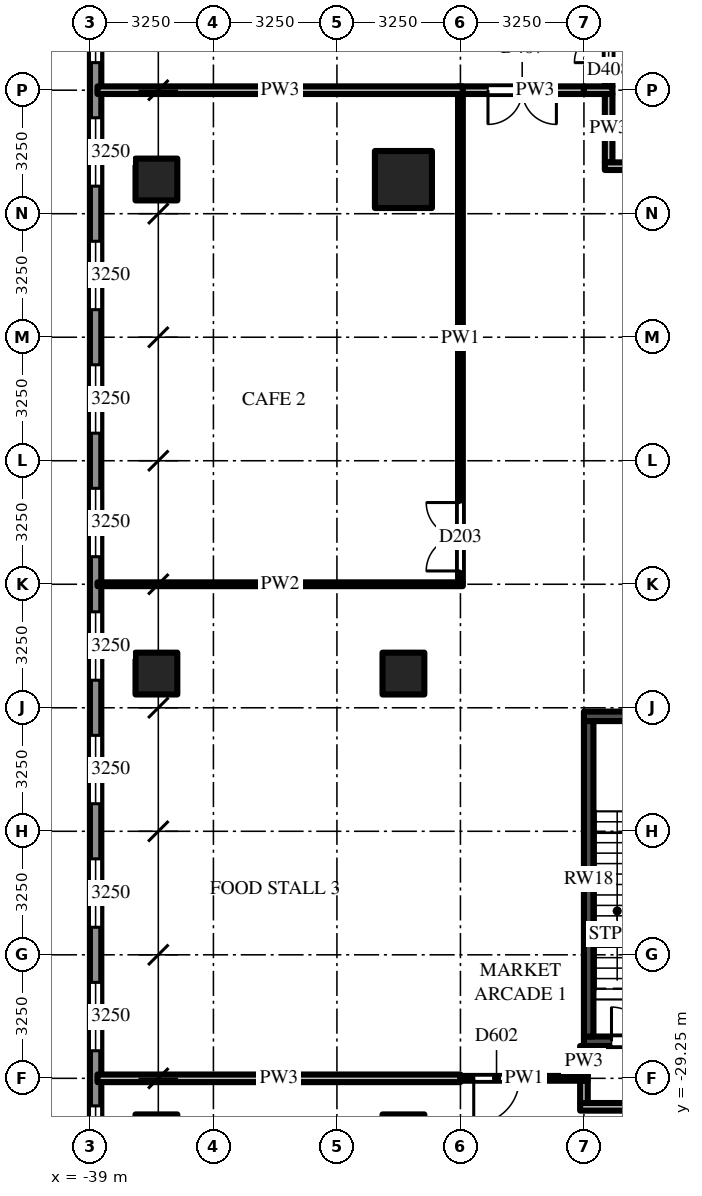
"""IFC4 building model, lengths in metres.
Left out: names, types, materials, properties, quantities, classifications, styles, units other than length and angle.
Written with IfcOpenShell. Run it as: python <this file> out.ifc"""

import sys

from ifc_helpers import new_model, si_unit, direction, frame, frame_2d, origin, origin_2d, place, context, subcontext, project, spatial, rectangle, extrude, source, transform, mapped, element, fill, save


model = new_model("IFC4")
c1 = context("Model", 3, precision=1e-05, world=origin(), true_north=direction((0.0, 1.0)))
c2 = subcontext(c1, "Body", "Model", "MODEL_VIEW")
j1 = project(units=[si_unit("LENGTHUNIT", "METRE"), si_unit("PLANEANGLEUNIT", "RADIAN")], contexts=[c1])
p1 = place(None, origin())
s1 = spatial("IfcSite", under=j1, at=p1, CompositionType="ELEMENT")
p2 = place(p1, origin())
s2 = spatial("IfcBuilding", under=s1, at=p2, CompositionType="ELEMENT")
p3 = place(p2, frame((0.0, 0.0, 19.0)))
s3 = spatial("IfcBuildingStorey", under=s2, at=p3, CompositionType="ELEMENT", Elevation=19.0)
m1 = source(origin(), c2, "Body", "SweptSolid", [
    extrude(rectangle(XDim=1.5, YDim=1.5, at=origin_2d()), origin(), (0.0, 0.0, 1.0), 5.0),
])
p4 = place(p3, frame((-30.75, -5.6, 0.0), z_axis=(0.0, 0.0, 1.0), x_axis=(1.0, 0.0, 0.0)))
e1 = element("IfcColumn", 1, at=p4, inside=s3, PredefinedType="COLUMN", context=c2, shape_type="MappedRepresentation", body=[
    mapped(m1, transform((0.0, 0.0, 0.0))),
])
m2 = source(origin(), c2, "Body", "SweptSolid", [
    extrude(rectangle(XDim=1.1, YDim=1.1, at=origin_2d()), origin(), (0.0, 0.0, 1.0), 5.0),
])
for number, where, z_axis, x_axis in (
    (2, (-30.75, -18.6, 0.0), (0.0, 0.0, 1.0), (1.0, 0.0, 0.0)),
    (3, (-30.75, -30.75, 0.0), (0.0, 0.0, 1.0), (1.0, 0.0, 0.0)),
    (4, (-37.25, -5.6, 0.0), (0.0, 0.0, 1.0), (1.0, 0.0, 0.0)),
    (5, (-37.25, -18.6, 0.0), (0.0, 0.0, 1.0), (1.0, 0.0, 0.0)),
    (6, (-37.25, -30.75, 0.0), (0.0, 0.0, 1.0), (1.0, 0.0, 0.0)),
):
    element("IfcColumn", number, at=place(p3, frame(where, z_axis=z_axis, x_axis=x_axis)), inside=s3, PredefinedType="COLUMN", context=c2, shape_type="MappedRepresentation", body=[
        mapped(m2, transform((0.0, 0.0, 0.0))),
    ])
m3 = source(origin(), c2, "Body", "SweptSolid", [
    extrude(rectangle(XDim=6.5, YDim=0.25, at=frame_2d((3.25, 0.0))), origin(), (0.0, 0.0, 1.0), 4.7),
])
p5 = place(p3, frame((-26.0, -28.275, 0.0), z_axis=(0.0, 0.0, 1.0), x_axis=(1.0, 0.0, 0.0)))
e7 = element("IfcWall", 7, at=p5, inside=s3, PredefinedType="SHEAR", context=c2, shape_type="MappedRepresentation", body=[
    mapped(m3, transform((0.0, 0.0, 0.0))),
])
m4 = source(origin(), c2, "Body", "SweptSolid", [
    extrude(rectangle(XDim=1.8, YDim=2.1, at=frame_2d((0.9, 1.05))), frame((0.0, 0.135, 0.0), z_axis=(0.0, -1.0, 0.0), x_axis=(1.0, 0.0, 0.0)), (0.0, 0.0, 1.0), 0.27),
])
p6 = place(p5, frame((0.725, 0.0, 0.0)))
e8 = element("IfcOpeningElement", 8, at=p6, cuts=e7, PredefinedType="OPENING", context=c2, shape_type="MappedRepresentation", body=[
    mapped(m4, transform((0.0, 0.0, 0.0))),
])
p7 = place(p5, frame((3.975, 0.0, 0.0)))
e9 = element("IfcOpeningElement", 9, at=p7, cuts=e7, PredefinedType="OPENING", context=c2, shape_type="MappedRepresentation", body=[
    mapped(m4, transform((0.0, 0.0, 0.0))),
])
p8 = place(p3, frame((-26.0, -19.725, 0.0), z_axis=(0.0, 0.0, 1.0), x_axis=(1.0, 0.0, 0.0)))
e10 = element("IfcWall", 10, at=p8, inside=s3, PredefinedType="SHEAR", context=c2, shape_type="MappedRepresentation", body=[
    mapped(m3, transform((0.0, 0.0, 0.0))),
])
m5 = source(origin(), c2, "Body", "SweptSolid", [
    extrude(rectangle(XDim=8.3, YDim=0.25, at=frame_2d((4.15, 0.0))), origin(), (0.0, 0.0, 1.0), 4.7),
])
p9 = place(p3, frame((-25.875, -28.15, 0.0), z_axis=(0.0, 0.0, 1.0), x_axis=(0.0, 1.0, 0.0)))
e11 = element("IfcWall", 11, at=p9, inside=s3, PredefinedType="SHEAR", context=c2, shape_type="MappedRepresentation", body=[
    mapped(m5, transform((0.0, 0.0, 0.0))),
])
m6 = source(origin(), c2, "Body", "SweptSolid", [
    extrude(rectangle(XDim=71.5, YDim=0.3, at=frame_2d((35.75, 0.0))), origin(), (0.0, 0.0, 1.0), 4.7),
])
p10 = place(p3, frame((-38.85, 35.75, 0.0), z_axis=(0.0, 0.0, 1.0), x_axis=(0.0, -1.0, 0.0)))
e12 = element("IfcWall", 12, at=p10, inside=s3, PredefinedType="SOLIDWALL", context=c2, shape_type="MappedRepresentation", body=[
    mapped(m6, transform((0.0, 0.0, 0.0))),
])
m7 = source(origin(), c2, "Body", "SweptSolid", [
    extrude(rectangle(XDim=1.8, YDim=3.0, at=frame_2d((0.9, 1.5))), frame((0.0, 0.16, 0.0), z_axis=(0.0, -1.0, 0.0), x_axis=(1.0, 0.0, 0.0)), (0.0, 0.0, 1.0), 0.32),
])
p11 = place(p10, frame((0.725, 0.0, 0.9)))
e13 = element("IfcOpeningElement", 13, at=p11, cuts=e12, PredefinedType="OPENING", context=c2, shape_type="MappedRepresentation", body=[
    mapped(m7, transform((0.0, 0.0, 0.0))),
])
p12 = place(p10, frame((3.975, 0.0, 0.9)))
e14 = element("IfcOpeningElement", 14, at=p12, cuts=e12, PredefinedType="OPENING", context=c2, shape_type="MappedRepresentation", body=[
    mapped(m7, transform((0.0, 0.0, 0.0))),
])
p13 = place(p10, frame((7.225, 0.0, 0.9)))
e15 = element("IfcOpeningElement", 15, at=p13, cuts=e12, PredefinedType="OPENING", context=c2, shape_type="MappedRepresentation", body=[
    mapped(m7, transform((0.0, 0.0, 0.0))),
])
p14 = place(p10, frame((10.475, 0.0, 0.9)))
e16 = element("IfcOpeningElement", 16, at=p14, cuts=e12, PredefinedType="OPENING", context=c2, shape_type="MappedRepresentation", body=[
    mapped(m7, transform((0.0, 0.0, 0.0))),
])
p15 = place(p10, frame((13.725, 0.0, 0.9)))
e17 = element("IfcOpeningElement", 17, at=p15, cuts=e12, PredefinedType="OPENING", context=c2, shape_type="MappedRepresentation", body=[
    mapped(m7, transform((0.0, 0.0, 0.0))),
])
p16 = place(p10, frame((16.975, 0.0, 0.9)))
e18 = element("IfcOpeningElement", 18, at=p16, cuts=e12, PredefinedType="OPENING", context=c2, shape_type="MappedRepresentation", body=[
    mapped(m7, transform((0.0, 0.0, 0.0))),
])
p17 = place(p10, frame((20.225, 0.0, 0.9)))
e19 = element("IfcOpeningElement", 19, at=p17, cuts=e12, PredefinedType="OPENING", context=c2, shape_type="MappedRepresentation", body=[
    mapped(m7, transform((0.0, 0.0, 0.0))),
])
p18 = place(p10, frame((23.475, 0.0, 0.9)))
e20 = element("IfcOpeningElement", 20, at=p18, cuts=e12, PredefinedType="OPENING", context=c2, shape_type="MappedRepresentation", body=[
    mapped(m7, transform((0.0, 0.0, 0.0))),
])
p19 = place(p10, frame((26.725, 0.0, 0.9)))
e21 = element("IfcOpeningElement", 21, at=p19, cuts=e12, PredefinedType="OPENING", context=c2, shape_type="MappedRepresentation", body=[
    mapped(m7, transform((0.0, 0.0, 0.0))),
])
p20 = place(p10, frame((29.975, 0.0, 0.9)))
e22 = element("IfcOpeningElement", 22, at=p20, cuts=e12, PredefinedType="OPENING", context=c2, shape_type="MappedRepresentation", body=[
    mapped(m7, transform((0.0, 0.0, 0.0))),
])
p21 = place(p10, frame((33.225, 0.0, 0.9)))
e23 = element("IfcOpeningElement", 23, at=p21, cuts=e12, PredefinedType="OPENING", context=c2, shape_type="MappedRepresentation", body=[
    mapped(m7, transform((0.0, 0.0, 0.0))),
])
p22 = place(p10, frame((36.475, 0.0, 0.9)))
e24 = element("IfcOpeningElement", 24, at=p22, cuts=e12, PredefinedType="OPENING", context=c2, shape_type="MappedRepresentation", body=[
    mapped(m7, transform((0.0, 0.0, 0.0))),
])
p23 = place(p10, frame((39.725, 0.0, 0.9)))
e25 = element("IfcOpeningElement", 25, at=p23, cuts=e12, PredefinedType="OPENING", context=c2, shape_type="MappedRepresentation", body=[
    mapped(m7, transform((0.0, 0.0, 0.0))),
])
p24 = place(p10, frame((42.975, 0.0, 0.9)))
e26 = element("IfcOpeningElement", 26, at=p24, cuts=e12, PredefinedType="OPENING", context=c2, shape_type="MappedRepresentation", body=[
    mapped(m7, transform((0.0, 0.0, 0.0))),
])
p25 = place(p10, frame((46.225, 0.0, 0.9)))
e27 = element("IfcOpeningElement", 27, at=p25, cuts=e12, PredefinedType="OPENING", context=c2, shape_type="MappedRepresentation", body=[
    mapped(m7, transform((0.0, 0.0, 0.0))),
])
p26 = place(p10, frame((49.475, 0.0, 0.9)))
e28 = element("IfcOpeningElement", 28, at=p26, cuts=e12, PredefinedType="OPENING", context=c2, shape_type="MappedRepresentation", body=[
    mapped(m7, transform((0.0, 0.0, 0.0))),
])
p27 = place(p10, frame((52.725, 0.0, 0.9)))
e29 = element("IfcOpeningElement", 29, at=p27, cuts=e12, PredefinedType="OPENING", context=c2, shape_type="MappedRepresentation", body=[
    mapped(m7, transform((0.0, 0.0, 0.0))),
])
p28 = place(p10, frame((55.975, 0.0, 0.9)))
e30 = element("IfcOpeningElement", 30, at=p28, cuts=e12, PredefinedType="OPENING", context=c2, shape_type="MappedRepresentation", body=[
    mapped(m7, transform((0.0, 0.0, 0.0))),
])
p29 = place(p10, frame((59.225, 0.0, 0.9)))
e31 = element("IfcOpeningElement", 31, at=p29, cuts=e12, PredefinedType="OPENING", context=c2, shape_type="MappedRepresentation", body=[
    mapped(m7, transform((0.0, 0.0, 0.0))),
])
p30 = place(p10, frame((62.475, 0.0, 0.9)))
e32 = element("IfcOpeningElement", 32, at=p30, cuts=e12, PredefinedType="OPENING", context=c2, shape_type="MappedRepresentation", body=[
    mapped(m7, transform((0.0, 0.0, 0.0))),
])
p31 = place(p10, frame((65.725, 0.0, 0.9)))
e33 = element("IfcOpeningElement", 33, at=p31, cuts=e12, PredefinedType="OPENING", context=c2, shape_type="MappedRepresentation", body=[
    mapped(m7, transform((0.0, 0.0, 0.0))),
])
p32 = place(p10, frame((68.975, 0.0, 0.9)))
e34 = element("IfcOpeningElement", 34, at=p32, cuts=e12, PredefinedType="OPENING", context=c2, shape_type="MappedRepresentation", body=[
    mapped(m7, transform((0.0, 0.0, 0.0))),
])
p33 = place(p3, frame((-29.25, -16.2, 0.0), z_axis=(0.0, 0.0, 1.0), x_axis=(0.0, 1.0, 0.0)))
e35 = element("IfcWall", 35, at=p33, inside=s3, PredefinedType="PARTITIONING", context=c2, shape_type="SweptSolid", body=[
    extrude(rectangle(XDim=12.85, YDim=0.125, at=frame_2d((6.425, 0.0))), origin(), (0.0, 0.0, 1.0), 3.762),
])
m8 = source(origin(), c2, "Body", "SweptSolid", [
    extrude(rectangle(XDim=1.8, YDim=2.1, at=frame_2d((0.9, 1.05))), frame((0.0, 0.073, 0.0), z_axis=(0.0, -1.0, 0.0), x_axis=(1.0, 0.0, 0.0)), (0.0, 0.0, 1.0), 0.145),
])
p34 = place(p33, frame((0.3, 0.0, 0.0)))
e36 = element("IfcOpeningElement", 36, at=p34, cuts=e35, PredefinedType="OPENING", context=c2, shape_type="MappedRepresentation", body=[
    mapped(m8, transform((0.0, 0.0, 0.0))),
])
m9 = source(origin(), c2, "Body", "SweptSolid", [
    extrude(rectangle(XDim=0.788, YDim=0.2, at=frame_2d((0.394, 0.0))), origin(), (0.0, 0.0, 1.0), 4.7),
])
p35 = place(p3, frame((-26.0, -29.188, 0.0), z_axis=(0.0, 0.0, 1.0), x_axis=(0.0, 1.0, 0.0)))
e37 = element("IfcWall", 37, at=p35, inside=s3, PredefinedType="PARTITIONING", context=c2, shape_type="MappedRepresentation", body=[
    mapped(m9, transform((0.0, 0.0, 0.0))),
])
m10 = source(origin(), c2, "Body", "SweptSolid", [
    extrude(rectangle(XDim=0.587, YDim=0.2, at=frame_2d((0.294, 0.0))), origin(), (0.0, 0.0, 1.0), 4.7),
])
p36 = place(p3, frame((-26.0, -29.9, 0.0), z_axis=(0.0, 0.0, 1.0), x_axis=(0.0, 1.0, 0.0)))
e38 = element("IfcWall", 38, at=p36, inside=s3, PredefinedType="PARTITIONING", context=c2, shape_type="MappedRepresentation", body=[
    mapped(m10, transform((0.0, 0.0, 0.0))),
])
m11 = source(origin(), c2, "Body", "SweptSolid", [
    extrude(rectangle(XDim=3.05, YDim=0.2, at=frame_2d((1.525, 0.0))), origin(), (0.0, 0.0, 1.0), 4.077),
])
p37 = place(p3, frame((-25.35, -3.15, 0.0), z_axis=(0.0, 0.0, 1.0), x_axis=(0.0, 1.0, 0.0)))
e39 = element("IfcWall", 39, at=p37, inside=s3, PredefinedType="PARTITIONING", context=c2, shape_type="MappedRepresentation", body=[
    mapped(m11, transform((0.0, 0.0, 0.0))),
])
m12 = source(origin(), c2, "Body", "SweptSolid", [
    extrude(rectangle(XDim=1.8, YDim=2.1, at=frame_2d((0.9, 1.05))), frame((0.0, 0.11, 0.0), z_axis=(0.0, -1.0, 0.0), x_axis=(1.0, 0.0, 0.0)), (0.0, 0.0, 1.0), 0.22),
])
p38 = place(p37, frame((0.625, 0.0, 0.0)))
e40 = element("IfcOpeningElement", 40, at=p38, cuts=e39, PredefinedType="OPENING", context=c2, shape_type="MappedRepresentation", body=[
    mapped(m12, transform((0.0, 0.0, 0.0))),
])
m13 = source(origin(), c2, "Body", "SweptSolid", [
    extrude(rectangle(XDim=1.8, YDim=0.2, at=frame_2d((0.9, 0.0))), origin(), (0.0, 0.0, 1.0), 4.7),
])
p39 = place(p3, frame((-25.35, -3.35, 0.0), z_axis=(0.0, 0.0, 1.0), x_axis=(0.0, -1.0, 0.0)))
e41 = element("IfcWall", 41, at=p39, inside=s3, PredefinedType="PARTITIONING", context=c2, shape_type="MappedRepresentation", body=[
    mapped(m13, transform((0.0, 0.0, 0.0))),
])
m14 = source(origin(), c2, "Body", "SweptSolid", [
    extrude(rectangle(XDim=8.2, YDim=0.2, at=frame_2d((4.1, 0.0))), origin(), (0.0, 0.0, 1.0), 3.762),
])
p40 = place(p3, frame((-17.9, -30.0, 0.0), z_axis=(0.0, 0.0, 1.0), x_axis=(-1.0, 0.0, 0.0)))
e42 = element("IfcWall", 42, at=p40, inside=s3, PredefinedType="PARTITIONING", context=c2, shape_type="MappedRepresentation", body=[
    mapped(m14, transform((0.0, 0.0, 0.0))),
])
p41 = place(p3, frame((-38.8, -29.25, 0.0), z_axis=(0.0, 0.0, 1.0), x_axis=(1.0, 0.0, 0.0)))
e43 = element("IfcWall", 43, at=p41, inside=s3, PredefinedType="PARTITIONING", context=c2, shape_type="SweptSolid", body=[
    extrude(rectangle(XDim=9.55, YDim=0.2, at=frame_2d((4.775, 0.0))), origin(), (0.0, 0.0, 1.0), 3.762),
])
p42 = place(p3, frame((-25.9, -29.25, 0.0), z_axis=(0.0, 0.0, 1.0), x_axis=(-1.0, 0.0, 0.0)))
e44 = element("IfcWall", 44, at=p42, inside=s3, PredefinedType="PARTITIONING", context=c2, shape_type="SweptSolid", body=[
    extrude(rectangle(XDim=3.35, YDim=0.125, at=frame_2d((1.675, 0.0))), origin(), (0.0, 0.0, 1.0), 4.7),
])
m15 = source(origin(), c2, "Body", "SweptSolid", [
    extrude(rectangle(XDim=1.2, YDim=2.1, at=frame_2d((0.6, 1.05))), frame((0.0, 0.073, 0.0), z_axis=(0.0, -1.0, 0.0), x_axis=(1.0, 0.0, 0.0)), (0.0, 0.0, 1.0), 0.145),
])
p43 = place(p42, frame((1.8, 0.0, 0.0)))
e45 = element("IfcOpeningElement", 45, at=p43, cuts=e44, PredefinedType="OPENING", context=c2, shape_type="MappedRepresentation", body=[
    mapped(m15, transform((0.0, 0.0, 0.0))),
])
m16 = source(origin(), c2, "Body", "SweptSolid", [
    extrude(rectangle(XDim=9.613, YDim=0.1, at=frame_2d((4.806, 0.0))), origin(), (0.0, 0.0, 1.0), 3.762),
])
p44 = place(p3, frame((-38.8, -16.25, 0.0), z_axis=(0.0, 0.0, 1.0), x_axis=(1.0, 0.0, 0.0)))
e46 = element("IfcWall", 46, at=p44, inside=s3, PredefinedType="PARTITIONING", context=c2, shape_type="MappedRepresentation", body=[
    mapped(m16, transform((0.0, 0.0, 0.0))),
])
m17 = source(origin(), c2, "Body", "SweptSolid", [
    extrude(rectangle(XDim=1.45, YDim=0.2, at=frame_2d((0.725, 0.0))), origin(), (0.0, 0.0, 1.0), 4.7),
])
p45 = place(p3, frame((-24.0, -5.25, 0.0), z_axis=(0.0, 0.0, 1.0), x_axis=(-1.0, 0.0, 0.0)))
e47 = element("IfcWall", 47, at=p45, inside=s3, PredefinedType="PARTITIONING", context=c2, shape_type="MappedRepresentation", body=[
    mapped(m17, transform((0.0, 0.0, 0.0))),
])
m18 = source(origin(), c2, "Body", "SweptSolid", [
    extrude(rectangle(XDim=3.312, YDim=0.2, at=frame_2d((1.656, 0.0))), origin(), (0.0, 0.0, 1.0), 4.7),
])
p46 = place(p3, frame((-26.0, -3.25, 0.0), z_axis=(0.0, 0.0, 1.0), x_axis=(-1.0, 0.0, 0.0)))
e48 = element("IfcWall", 48, at=p46, inside=s3, PredefinedType="PARTITIONING", context=c2, shape_type="MappedRepresentation", body=[
    mapped(m18, transform((0.0, 0.0, 0.0))),
])
p47 = place(p46, frame((0.725, 0.0, 0.0)))
e49 = element("IfcOpeningElement", 49, at=p47, cuts=e48, PredefinedType="OPENING", context=c2, shape_type="MappedRepresentation", body=[
    mapped(m12, transform((0.0, 0.0, 0.0))),
])
m19 = source(origin(), c2, "Body", "SweptSolid", [
    extrude(rectangle(XDim=9.613, YDim=0.2, at=frame_2d((4.806, 0.0))), origin(), (0.0, 0.0, 1.0), 3.918),
])
p48 = place(p3, frame((-29.188, -3.25, 0.0), z_axis=(0.0, 0.0, 1.0), x_axis=(-1.0, 0.0, 0.0)))
e50 = element("IfcWall", 50, at=p48, inside=s3, PredefinedType="PARTITIONING", context=c2, shape_type="MappedRepresentation", body=[
    mapped(m19, transform((0.0, 0.0, 0.0))),
])
m20 = source(origin(), c2, "Body", "SweptSolid", [
    extrude(rectangle(XDim=0.75, YDim=0.2, at=frame_2d((0.375, 0.0))), origin(), (0.0, 0.0, 1.0), 4.7),
])
p49 = place(p3, frame((-25.25, -3.25, 0.0), z_axis=(0.0, 0.0, 1.0), x_axis=(-1.0, 0.0, 0.0)))
e51 = element("IfcWall", 51, at=p49, inside=s3, PredefinedType="PARTITIONING", context=c2, shape_type="MappedRepresentation", body=[
    mapped(m20, transform((0.0, 0.0, 0.0))),
])
m21 = source(origin(), c2, "Body", "SweptSolid", [
    extrude(rectangle(XDim=1.8, YDim=2.1, at=frame_2d((0.9, 1.05))), frame((0.0, 0.025, 0.0), z_axis=(0.0, -1.0, 0.0), x_axis=(1.0, 0.0, 0.0)), (0.0, 0.0, 1.0), 0.05),
])
p50 = place(p6, origin())
e52 = element("IfcDoor", 52, at=p50, inside=s3, OperationType="DOUBLE_DOOR_SINGLE_SWING", PredefinedType="DOOR", context=c2, shape_type="MappedRepresentation", body=[
    mapped(m21, transform((0.0, 0.0, 0.0))),
])
fill(e8, e52)
m22 = source(origin(), c2, "Body", "SweptSolid", [
    extrude(rectangle(XDim=1.8, YDim=3.0, at=frame_2d((0.9, 1.5))), frame((0.0, 0.03, 0.0), z_axis=(0.0, -1.0, 0.0), x_axis=(1.0, 0.0, 0.0)), (0.0, 0.0, 1.0), 0.06),
])
p51 = place(p22, origin())
e53 = element("IfcWindow", 53, at=p51, inside=s3, PartitioningType="SINGLE_PANEL", PredefinedType="WINDOW", context=c2, shape_type="MappedRepresentation", body=[
    mapped(m22, transform((0.0, 0.0, 0.0))),
])
fill(e24, e53)
p52 = place(p23, origin())
e54 = element("IfcWindow", 54, at=p52, inside=s3, PartitioningType="SINGLE_PANEL", PredefinedType="WINDOW", context=c2, shape_type="MappedRepresentation", body=[
    mapped(m22, transform((0.0, 0.0, 0.0))),
])
fill(e25, e54)
p53 = place(p24, origin())
e55 = element("IfcWindow", 55, at=p53, inside=s3, PartitioningType="SINGLE_PANEL", PredefinedType="WINDOW", context=c2, shape_type="MappedRepresentation", body=[
    mapped(m22, transform((0.0, 0.0, 0.0))),
])
fill(e26, e55)
p54 = place(p25, origin())
e56 = element("IfcWindow", 56, at=p54, inside=s3, PartitioningType="SINGLE_PANEL", PredefinedType="WINDOW", context=c2, shape_type="MappedRepresentation", body=[
    mapped(m22, transform((0.0, 0.0, 0.0))),
])
fill(e27, e56)
p55 = place(p26, origin())
e57 = element("IfcWindow", 57, at=p55, inside=s3, PartitioningType="SINGLE_PANEL", PredefinedType="WINDOW", context=c2, shape_type="MappedRepresentation", body=[
    mapped(m22, transform((0.0, 0.0, 0.0))),
])
fill(e28, e57)
p56 = place(p27, origin())
e58 = element("IfcWindow", 58, at=p56, inside=s3, PartitioningType="SINGLE_PANEL", PredefinedType="WINDOW", context=c2, shape_type="MappedRepresentation", body=[
    mapped(m22, transform((0.0, 0.0, 0.0))),
])
fill(e29, e58)
p57 = place(p28, origin())
e59 = element("IfcWindow", 59, at=p57, inside=s3, PartitioningType="SINGLE_PANEL", PredefinedType="WINDOW", context=c2, shape_type="MappedRepresentation", body=[
    mapped(m22, transform((0.0, 0.0, 0.0))),
])
fill(e30, e59)
p58 = place(p29, origin())
e60 = element("IfcWindow", 60, at=p58, inside=s3, PartitioningType="SINGLE_PANEL", PredefinedType="WINDOW", context=c2, shape_type="MappedRepresentation", body=[
    mapped(m22, transform((0.0, 0.0, 0.0))),
])
fill(e31, e60)
p59 = place(p30, origin())
e61 = element("IfcWindow", 61, at=p59, inside=s3, PartitioningType="SINGLE_PANEL", PredefinedType="WINDOW", context=c2, shape_type="MappedRepresentation", body=[
    mapped(m22, transform((0.0, 0.0, 0.0))),
])
fill(e32, e61)
p60 = place(p31, origin())
e62 = element("IfcWindow", 62, at=p60, inside=s3, PartitioningType="SINGLE_PANEL", PredefinedType="WINDOW", context=c2, shape_type="MappedRepresentation", body=[
    mapped(m22, transform((0.0, 0.0, 0.0))),
])
fill(e33, e62)
m23 = source(origin(), c2, "Body", "SweptSolid", [
    extrude(rectangle(XDim=1.2, YDim=2.1, at=frame_2d((0.6, 1.05))), frame((0.0, 0.025, 0.0), z_axis=(0.0, -1.0, 0.0), x_axis=(1.0, 0.0, 0.0)), (0.0, 0.0, 1.0), 0.05),
])
p61 = place(p43, origin())
e63 = element("IfcDoor", 63, at=p61, inside=s3, OperationType="SINGLE_SWING_RIGHT", PredefinedType="DOOR", context=c2, shape_type="MappedRepresentation", body=[
    mapped(m23, transform((0.0, 0.0, 0.0))),
])
fill(e45, e63)
p62 = place(p34, origin())
e64 = element("IfcDoor", 64, at=p62, inside=s3, OperationType="DOUBLE_DOOR_SINGLE_SWING", PredefinedType="DOOR", context=c2, shape_type="MappedRepresentation", body=[
    mapped(m21, transform((0.0, 0.0, 0.0))),
])
fill(e36, e64)
p63 = place(p47, origin())
e65 = element("IfcDoor", 65, at=p63, inside=s3, OperationType="DOUBLE_DOOR_SINGLE_SWING", PredefinedType="DOOR", context=c2, shape_type="MappedRepresentation", body=[
    mapped(m21, transform((0.0, 0.0, 0.0))),
])
fill(e49, e65)
p64 = place(p38, origin())
e66 = element("IfcDoor", 66, at=p64, inside=s3, OperationType="DOUBLE_DOOR_SINGLE_SWING", PredefinedType="DOOR", context=c2, shape_type="MappedRepresentation", body=[
    mapped(m21, transform((0.0, 0.0, 0.0))),
])
fill(e40, e66)
save(model, sys.argv[1])
